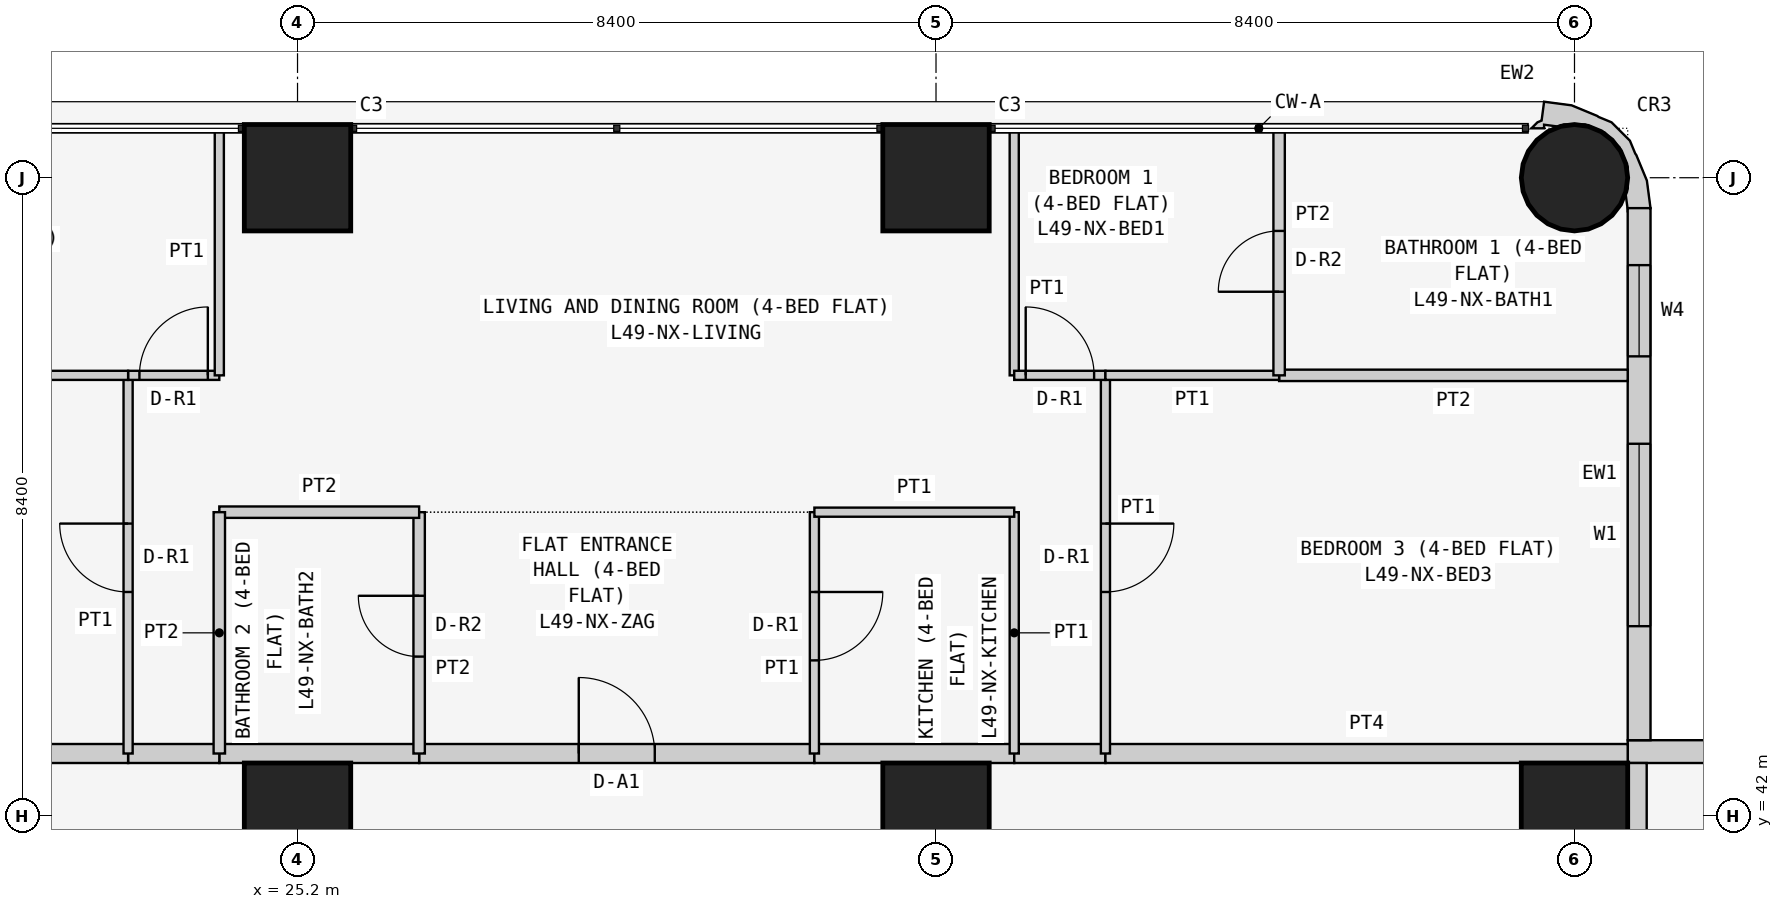
"""IFC4 building model, lengths in metres.
Left out: names, types, materials, properties, quantities, classifications, styles, units other than length and angle.
Written with IfcOpenShell. Run it as: python <this file> out.ifc"""

import sys

from ifc_helpers import new_model, si_unit, direction, frame, frame_2d, origin, origin_2d, place, context, subcontext, project, spatial, polyline, rectangle, circle, outline, extrude, element, fill, save


model = new_model("IFC4")
c1 = context("Model", 3, precision=1e-05, world=origin(), true_north=direction((0.0, 1.0)))
c2 = subcontext(c1, "Body", "Model", "MODEL_VIEW")
j1 = project(units=[si_unit("LENGTHUNIT", "METRE"), si_unit("PLANEANGLEUNIT", "RADIAN")], contexts=[c1])
p1 = place(None, origin())
s1 = spatial("IfcSite", under=j1, at=p1, CompositionType="ELEMENT")
p2 = place(p1, origin())
s2 = spatial("IfcBuilding", under=s1, at=p2, CompositionType="ELEMENT")
p3 = place(p2, frame((0.0, 0.0, 190.5)))
s3 = spatial("IfcBuildingStorey", under=s2, at=p3, CompositionType="ELEMENT", Elevation=190.5)
for number, where, z_axis, x_axis in (
    (1, (25.2, 42.0, 0.0), (0.0, 0.0, 1.0), (1.0, 0.0, 0.0)),
    (2, (25.2, 50.4, 0.0), (0.0, 0.0, 1.0), (1.0, 0.0, 0.0)),
    (3, (33.6, 42.0, 0.0), (0.0, 0.0, 1.0), (1.0, 0.0, 0.0)),
    (4, (33.6, 50.4, 0.0), (0.0, 0.0, 1.0), (1.0, 0.0, 0.0)),
    (5, (42.0, 42.0, 0.0), (0.0, 0.0, 1.0), (1.0, 0.0, 0.0)),
):
    element("IfcColumn", number, at=place(p3, frame(where, z_axis=z_axis, x_axis=x_axis)), inside=s3, PredefinedType="COLUMN", context=c2, shape_type="SweptSolid", body=[
        extrude(rectangle(XDim=1.4, YDim=1.4, at=origin_2d()), origin(), (0.0, 0.0, 1.0), 3.6),
    ])
p4 = place(p3, frame((42.0, 50.4, 0.0), z_axis=(0.0, 0.0, 1.0), x_axis=(1.0, 0.0, 0.0)))
e6 = element("IfcColumn", 6, at=p4, inside=s3, PredefinedType="COLUMN", context=c2, shape_type="SweptSolid", body=[
    extrude(circle(Radius=0.7, at=origin_2d()), origin(), (0.0, 0.0, 1.0), 3.6),
])
p5 = place(p3, frame((50.0, 42.85, 0.0), z_axis=(0.0, 0.0, 1.0), x_axis=(-1.0, 0.0, 0.0)))
e7 = element("IfcWall", 7, at=p5, inside=s3, PredefinedType="SOLIDWALL", context=c2, shape_type="SweptSolid", body=[
    extrude(rectangle(XDim=7.3, YDim=0.3, at=frame_2d((3.65, 0.0))), origin(), (0.0, 0.0, 1.0), 3.45),
])
p6 = place(p5, frame((3.1, 0.0, 0.9)))
e8 = element("IfcOpeningElement", 8, at=p6, cuts=e7, PredefinedType="OPENING", context=c2, shape_type="SweptSolid", body=[
    extrude(rectangle(XDim=2.4, YDim=1.5, at=frame_2d((1.2, 0.75))), frame((0.0, 0.16, 0.0), z_axis=(0.0, -1.0, 0.0), x_axis=(1.0, 0.0, 0.0)), (0.0, 0.0, 1.0), 0.32),
])
p7 = place(p5, frame((0.75, 0.0, 0.9)))
e9 = element("IfcOpeningElement", 9, at=p7, cuts=e7, PredefinedType="OPENING", context=c2, shape_type="SweptSolid", body=[
    extrude(rectangle(XDim=1.2, YDim=1.5, at=frame_2d((0.6, 0.75))), frame((0.0, 0.16, 0.0), z_axis=(0.0, -1.0, 0.0), x_axis=(1.0, 0.0, 0.0)), (0.0, 0.0, 1.0), 0.32),
])
p8 = place(p3, frame((42.85, 43.0, 0.0), z_axis=(0.0, 0.0, 1.0), x_axis=(0.0, 1.0, 0.0)))
e10 = element("IfcWall", 10, at=p8, inside=s3, PredefinedType="SOLIDWALL", context=c2, shape_type="SweptSolid", body=[
    extrude(rectangle(XDim=7.0, YDim=0.3, at=frame_2d((3.5, 0.0))), origin(), (0.0, 0.0, 1.0), 3.45),
])
p9 = place(p8, frame((1.5, 0.0, 0.9)))
e11 = element("IfcOpeningElement", 11, at=p9, cuts=e10, PredefinedType="OPENING", context=c2, shape_type="SweptSolid", body=[
    extrude(rectangle(XDim=2.4, YDim=1.5, at=frame_2d((1.2, 0.75))), frame((0.0, 0.16, 0.0), z_axis=(0.0, -1.0, 0.0), x_axis=(1.0, 0.0, 0.0)), (0.0, 0.0, 1.0), 0.32),
])
p10 = place(p8, frame((5.05, 0.0, 0.9)))
e12 = element("IfcOpeningElement", 12, at=p10, cuts=e10, PredefinedType="OPENING", context=c2, shape_type="SweptSolid", body=[
    extrude(rectangle(XDim=1.2, YDim=1.5, at=frame_2d((0.6, 0.75))), frame((0.0, 0.16, 0.0), z_axis=(0.0, -1.0, 0.0), x_axis=(1.0, 0.0, 0.0)), (0.0, 0.0, 1.0), 0.32),
])
p11 = place(p3, frame((42.724, 50.11, 0.0), z_axis=(0.0, 0.0, 1.0), x_axis=(0.439933741929, 0.898030234854, 0.0)))
e13 = element("IfcWall", 13, at=p11, inside=s3, PredefinedType="SOLIDWALL", context=c2, shape_type="SweptSolid", body=[
    extrude(outline(polyline([(-0.145, -0.044), (0.022, -0.296), (0.327, -0.094), (0.568, 0.18), (0.577, 0.199), (0.7, 0.337), (0.811, 0.661), (0.799, 0.845), (0.803, 0.866), (0.78, 1.231), (0.664, 1.577), (0.426, 1.497), (0.382, 1.536), (0.276, 1.572), (0.349, 1.423), (0.392, 1.444), (0.453, 1.261), (0.51, 1.211), (0.632, 0.961), (0.65, 0.683), (0.56, 0.419), (0.375, 0.21), (0.125, 0.087), (0.05, 0.082), (-0.127, -0.035), (-0.145, -0.044)])), origin(), (0.0, 0.0, 1.0), 3.45),
])
p12 = place(p3, frame((26.8, 42.825, 0.0), z_axis=(0.0, 0.0, 1.0), x_axis=(1.0, 0.0, 0.0)))
e14 = element("IfcWall", 14, at=p12, inside=s3, PredefinedType="PARTITIONING", context=c2, shape_type="SweptSolid", body=[
    extrude(rectangle(XDim=5.2, YDim=0.25, at=frame_2d((2.6, 0.0))), origin(), (0.0, 0.0, 1.0), 3.45),
])
p13 = place(p12, frame((2.1, 0.0, 0.0)))
e15 = element("IfcOpeningElement", 15, at=p13, cuts=e14, PredefinedType="OPENING", context=c2, shape_type="SweptSolid", body=[
    extrude(rectangle(XDim=1.0, YDim=2.1, at=frame_2d((0.5, 1.05))), frame((0.0, 0.135, 0.0), z_axis=(0.0, -1.0, 0.0), x_axis=(1.0, 0.0, 0.0)), (0.0, 0.0, 1.0), 0.27),
])
p14 = place(p3, frame((24.171, 42.825, 0.0), z_axis=(0.0, 0.0, 1.0), x_axis=(1.0, 0.0, 0.0)))
e16 = element("IfcWall", 16, at=p14, inside=s3, PredefinedType="PARTITIONING", context=c2, shape_type="SweptSolid", body=[
    extrude(rectangle(XDim=2.629, YDim=0.25, at=frame_2d((1.314, 0.0))), origin(), (0.0, 0.0, 1.0), 3.45),
])
p15 = place(p3, frame((32.0, 42.825, 0.0), z_axis=(0.0, 0.0, 1.0), x_axis=(1.0, 0.0, 0.0)))
e17 = element("IfcWall", 17, at=p15, inside=s3, PredefinedType="PARTITIONING", context=c2, shape_type="SweptSolid", body=[
    extrude(rectangle(XDim=2.629, YDim=0.25, at=frame_2d((1.314, 0.0))), origin(), (0.0, 0.0, 1.0), 3.45),
])
p16 = place(p3, frame((22.971, 42.825, 0.0), z_axis=(0.0, 0.0, 1.0), x_axis=(1.0, 0.0, 0.0)))
e18 = element("IfcWall", 18, at=p16, inside=s3, PredefinedType="PARTITIONING", context=c2, shape_type="SweptSolid", body=[
    extrude(rectangle(XDim=1.2, YDim=0.25, at=frame_2d((0.6, 0.0))), origin(), (0.0, 0.0, 1.0), 3.45),
])
p17 = place(p3, frame((34.629, 42.825, 0.0), z_axis=(0.0, 0.0, 1.0), x_axis=(1.0, 0.0, 0.0)))
e19 = element("IfcWall", 19, at=p17, inside=s3, PredefinedType="PARTITIONING", context=c2, shape_type="SweptSolid", body=[
    extrude(rectangle(XDim=1.2, YDim=0.25, at=frame_2d((0.6, 0.0))), origin(), (0.0, 0.0, 1.0), 3.45),
])
for number, where, z_axis, x_axis in (
    (20, (16.1, 42.825, 0.0), (0.0, 0.0, 1.0), (1.0, 0.0, 0.0)),
    (21, (35.829, 42.825, 0.0), (0.0, 0.0, 1.0), (1.0, 0.0, 0.0)),
    (22, (42.825, 42.7, 0.0), (0.0, 0.0, 1.0), (0.0, -1.0, 0.0)),
):
    element("IfcWall", number, at=place(p3, frame(where, z_axis=z_axis, x_axis=x_axis)), inside=s3, PredefinedType="PARTITIONING", context=c2, shape_type="SweptSolid", body=[
        extrude(rectangle(XDim=6.871, YDim=0.25, at=frame_2d((3.436, 0.0))), origin(), (0.0, 0.0, 1.0), 3.45),
    ])
p18 = place(p3, frame((26.8, 46.0, 0.0), z_axis=(0.0, 0.0, 1.0), x_axis=(0.0, -1.0, 0.0)))
e23 = element("IfcWall", 23, at=p18, inside=s3, PredefinedType="PARTITIONING", context=c2, shape_type="SweptSolid", body=[
    extrude(rectangle(XDim=3.175, YDim=0.15, at=frame_2d((1.587, 0.0))), origin(), (0.0, 0.0, 1.0), 3.45),
])
p19 = place(p18, frame((1.1, 0.0, 0.0)))
e24 = element("IfcOpeningElement", 24, at=p19, cuts=e23, PredefinedType="OPENING", context=c2, shape_type="SweptSolid", body=[
    extrude(rectangle(XDim=0.8, YDim=2.1, at=frame_2d((0.4, 1.05))), frame((0.0, 0.085, 0.0), z_axis=(0.0, -1.0, 0.0), x_axis=(1.0, 0.0, 0.0)), (0.0, 0.0, 1.0), 0.17),
])
p20 = place(p3, frame((32.0, 42.825, 0.0), z_axis=(0.0, 0.0, 1.0), x_axis=(0.0, 1.0, 0.0)))
e25 = element("IfcWall", 25, at=p20, inside=s3, PredefinedType="PARTITIONING", context=c2, shape_type="SweptSolid", body=[
    extrude(rectangle(XDim=3.175, YDim=0.12, at=frame_2d((1.587, 0.0))), origin(), (0.0, 0.0, 1.0), 3.45),
])
p21 = place(p20, frame((1.225, 0.0, 0.0)))
e26 = element("IfcOpeningElement", 26, at=p21, cuts=e25, PredefinedType="OPENING", context=c2, shape_type="SweptSolid", body=[
    extrude(rectangle(XDim=0.9, YDim=2.1, at=frame_2d((0.45, 1.05))), frame((0.0, 0.07, 0.0), z_axis=(0.0, -1.0, 0.0), x_axis=(1.0, 0.0, 0.0)), (0.0, 0.0, 1.0), 0.14),
])
p22 = place(p3, frame((26.8, 46.0, 0.0), z_axis=(0.0, 0.0, 1.0), x_axis=(-1.0, 0.0, 0.0)))
e27 = element("IfcWall", 27, at=p22, inside=s3, PredefinedType="PARTITIONING", context=c2, shape_type="SweptSolid", body=[
    extrude(rectangle(XDim=2.629, YDim=0.15, at=frame_2d((1.314, 0.0))), origin(), (0.0, 0.0, 1.0), 3.45),
])
p23 = place(p3, frame((24.171, 46.0, 0.0), z_axis=(0.0, 0.0, 1.0), x_axis=(0.0, -1.0, 0.0)))
e28 = element("IfcWall", 28, at=p23, inside=s3, PredefinedType="PARTITIONING", context=c2, shape_type="SweptSolid", body=[
    extrude(rectangle(XDim=3.175, YDim=0.15, at=frame_2d((1.587, 0.0))), origin(), (0.0, 0.0, 1.0), 3.45),
])
p24 = place(p3, frame((34.629, 42.825, 0.0), z_axis=(0.0, 0.0, 1.0), x_axis=(0.0, 1.0, 0.0)))
e29 = element("IfcWall", 29, at=p24, inside=s3, PredefinedType="PARTITIONING", context=c2, shape_type="SweptSolid", body=[
    extrude(rectangle(XDim=3.175, YDim=0.12, at=frame_2d((1.587, 0.0))), origin(), (0.0, 0.0, 1.0), 3.45),
])
p25 = place(p3, frame((34.629, 46.0, 0.0), z_axis=(0.0, 0.0, 1.0), x_axis=(-1.0, 0.0, 0.0)))
e30 = element("IfcWall", 30, at=p25, inside=s3, PredefinedType="PARTITIONING", context=c2, shape_type="SweptSolid", body=[
    extrude(rectangle(XDim=2.629, YDim=0.12, at=frame_2d((1.314, 0.0))), origin(), (0.0, 0.0, 1.0), 3.45),
])
p26 = place(p3, frame((22.971, 42.825, 0.0), z_axis=(0.0, 0.0, 1.0), x_axis=(0.0, 1.0, 0.0)))
e31 = element("IfcWall", 31, at=p26, inside=s3, PredefinedType="PARTITIONING", context=c2, shape_type="SweptSolid", body=[
    extrude(rectangle(XDim=4.975, YDim=0.12, at=frame_2d((2.488, 0.0))), origin(), (0.0, 0.0, 1.0), 3.45),
])
p27 = place(p26, frame((2.125, 0.0, 0.0)))
e32 = element("IfcOpeningElement", 32, at=p27, cuts=e31, PredefinedType="OPENING", context=c2, shape_type="SweptSolid", body=[
    extrude(rectangle(XDim=0.9, YDim=2.1, at=frame_2d((0.45, 1.05))), frame((0.0, 0.07, 0.0), z_axis=(0.0, -1.0, 0.0), x_axis=(1.0, 0.0, 0.0)), (0.0, 0.0, 1.0), 0.14),
])
p28 = place(p3, frame((22.971, 47.8, 0.0), z_axis=(0.0, 0.0, 1.0), x_axis=(1.0, 0.0, 0.0)))
e33 = element("IfcWall", 33, at=p28, inside=s3, PredefinedType="PARTITIONING", context=c2, shape_type="SweptSolid", body=[
    extrude(rectangle(XDim=1.2, YDim=0.12, at=frame_2d((0.6, 0.0))), origin(), (0.0, 0.0, 1.0), 3.45),
])
p29 = place(p28, frame((0.149, 0.0, 0.0)))
e34 = element("IfcOpeningElement", 34, at=p29, cuts=e33, PredefinedType="OPENING", context=c2, shape_type="SweptSolid", body=[
    extrude(rectangle(XDim=0.9, YDim=2.1, at=frame_2d((0.45, 1.05))), frame((0.0, 0.07, 0.0), z_axis=(0.0, -1.0, 0.0), x_axis=(1.0, 0.0, 0.0)), (0.0, 0.0, 1.0), 0.14),
])
p30 = place(p3, frame((24.171, 47.8, 0.0), z_axis=(0.0, 0.0, 1.0), x_axis=(0.0, 1.0, 0.0)))
e35 = element("IfcWall", 35, at=p30, inside=s3, PredefinedType="PARTITIONING", context=c2, shape_type="SweptSolid", body=[
    extrude(rectangle(XDim=3.25, YDim=0.12, at=frame_2d((1.625, 0.0))), origin(), (0.0, 0.0, 1.0), 3.45),
])
p31 = place(p3, frame((35.829, 47.8, 0.0), z_axis=(0.0, 0.0, 1.0), x_axis=(0.0, -1.0, 0.0)))
e36 = element("IfcWall", 36, at=p31, inside=s3, PredefinedType="PARTITIONING", context=c2, shape_type="SweptSolid", body=[
    extrude(rectangle(XDim=4.975, YDim=0.12, at=frame_2d((2.488, 0.0))), origin(), (0.0, 0.0, 1.0), 3.45),
])
p32 = place(p31, frame((1.95, 0.0, 0.0)))
e37 = element("IfcOpeningElement", 37, at=p32, cuts=e36, PredefinedType="OPENING", context=c2, shape_type="SweptSolid", body=[
    extrude(rectangle(XDim=0.9, YDim=2.1, at=frame_2d((0.45, 1.05))), frame((0.0, 0.07, 0.0), z_axis=(0.0, -1.0, 0.0), x_axis=(1.0, 0.0, 0.0)), (0.0, 0.0, 1.0), 0.14),
])
p33 = place(p3, frame((34.629, 51.05, 0.0), z_axis=(0.0, 0.0, 1.0), x_axis=(0.0, -1.0, 0.0)))
e38 = element("IfcWall", 38, at=p33, inside=s3, PredefinedType="PARTITIONING", context=c2, shape_type="SweptSolid", body=[
    extrude(rectangle(XDim=3.25, YDim=0.12, at=frame_2d((1.625, 0.0))), origin(), (0.0, 0.0, 1.0), 3.45),
])
p34 = place(p3, frame((34.629, 47.8, 0.0), z_axis=(0.0, 0.0, 1.0), x_axis=(1.0, 0.0, 0.0)))
e39 = element("IfcWall", 39, at=p34, inside=s3, PredefinedType="PARTITIONING", context=c2, shape_type="SweptSolid", body=[
    extrude(rectangle(XDim=1.2, YDim=0.12, at=frame_2d((0.6, 0.0))), origin(), (0.0, 0.0, 1.0), 3.45),
])
p35 = place(p34, frame((0.151, 0.0, 0.0)))
e40 = element("IfcOpeningElement", 40, at=p35, cuts=e39, PredefinedType="OPENING", context=c2, shape_type="SweptSolid", body=[
    extrude(rectangle(XDim=0.9, YDim=2.1, at=frame_2d((0.45, 1.05))), frame((0.0, 0.07, 0.0), z_axis=(0.0, -1.0, 0.0), x_axis=(1.0, 0.0, 0.0)), (0.0, 0.0, 1.0), 0.14),
])
p36 = place(p3, frame((22.971, 47.8, 0.0), z_axis=(0.0, 0.0, 1.0), x_axis=(-1.0, 0.0, 0.0)))
e41 = element("IfcWall", 41, at=p36, inside=s3, PredefinedType="PARTITIONING", context=c2, shape_type="SweptSolid", body=[
    extrude(rectangle(XDim=6.871, YDim=0.12, at=frame_2d((3.436, 0.0))), origin(), (0.0, 0.0, 1.0), 3.45),
])
p37 = place(p3, frame((42.7, 47.8, 0.0), z_axis=(0.0, 0.0, 1.0), x_axis=(-1.0, 0.0, 0.0)))
e42 = element("IfcWall", 42, at=p37, inside=s3, PredefinedType="PARTITIONING", context=c2, shape_type="SweptSolid", body=[
    extrude(rectangle(XDim=4.586, YDim=0.15, at=frame_2d((2.293, 0.0))), origin(), (0.0, 0.0, 1.0), 3.45),
])
p38 = place(p3, frame((38.114, 47.8, 0.0), z_axis=(0.0, 0.0, 1.0), x_axis=(-1.0, 0.0, 0.0)))
e43 = element("IfcWall", 43, at=p38, inside=s3, PredefinedType="PARTITIONING", context=c2, shape_type="SweptSolid", body=[
    extrude(rectangle(XDim=2.285, YDim=0.12, at=frame_2d((1.143, 0.0))), origin(), (0.0, 0.0, 1.0), 3.45),
])
p39 = place(p3, frame((38.114, 51.05, 0.0), z_axis=(0.0, 0.0, 1.0), x_axis=(0.0, -1.0, 0.0)))
e44 = element("IfcWall", 44, at=p39, inside=s3, PredefinedType="PARTITIONING", context=c2, shape_type="SweptSolid", body=[
    extrude(rectangle(XDim=3.25, YDim=0.15, at=frame_2d((1.625, 0.0))), origin(), (0.0, 0.0, 1.0), 3.45),
])
p40 = place(p39, frame((1.35, 0.0, 0.0)))
e45 = element("IfcOpeningElement", 45, at=p40, cuts=e44, PredefinedType="OPENING", context=c2, shape_type="SweptSolid", body=[
    extrude(rectangle(XDim=0.8, YDim=2.1, at=frame_2d((0.4, 1.05))), frame((0.0, 0.085, 0.0), z_axis=(0.0, -1.0, 0.0), x_axis=(1.0, 0.0, 0.0)), (0.0, 0.0, 1.0), 0.17),
])
p41 = place(p9, origin())
e46 = element("IfcWindow", 46, at=p41, inside=s3, PartitioningType="SINGLE_PANEL", PredefinedType="WINDOW", context=c2, shape_type="SweptSolid", body=[
    extrude(rectangle(XDim=2.4, YDim=1.5, at=frame_2d((1.2, 0.75))), frame((0.0, 0.03, 0.0), z_axis=(0.0, -1.0, 0.0), x_axis=(1.0, 0.0, 0.0)), (0.0, 0.0, 1.0), 0.06),
])
fill(e11, e46)
p42 = place(p10, origin())
e47 = element("IfcWindow", 47, at=p42, inside=s3, PartitioningType="SINGLE_PANEL", PredefinedType="WINDOW", context=c2, shape_type="SweptSolid", body=[
    extrude(rectangle(XDim=1.2, YDim=1.5, at=frame_2d((0.6, 0.75))), frame((0.0, 0.03, 0.0), z_axis=(0.0, -1.0, 0.0), x_axis=(1.0, 0.0, 0.0)), (0.0, 0.0, 1.0), 0.06),
])
fill(e12, e47)
p43 = place(p13, origin())
e48 = element("IfcDoor", 48, at=p43, inside=s3, OperationType="SINGLE_SWING_LEFT", PredefinedType="DOOR", context=c2, shape_type="SweptSolid", body=[
    extrude(rectangle(XDim=1.0, YDim=2.1, at=frame_2d((0.5, 1.05))), frame((0.0, 0.025, 0.0), z_axis=(0.0, -1.0, 0.0), x_axis=(1.0, 0.0, 0.0)), (0.0, 0.0, 1.0), 0.05),
])
fill(e15, e48)
p44 = place(p19, frame((0.8, 0.0, 0.0), z_axis=(0.0, 0.0, 1.0), x_axis=(-1.0, 0.0, 0.0)))
e49 = element("IfcDoor", 49, at=p44, inside=s3, OperationType="SINGLE_SWING_RIGHT", PredefinedType="DOOR", context=c2, shape_type="SweptSolid", body=[
    extrude(rectangle(XDim=0.8, YDim=2.1, at=frame_2d((0.4, 1.05))), frame((0.0, 0.025, 0.0), z_axis=(0.0, -1.0, 0.0), x_axis=(1.0, 0.0, 0.0)), (0.0, 0.0, 1.0), 0.05),
])
fill(e24, e49)
p45 = place(p21, frame((0.9, 0.0, 0.0), z_axis=(0.0, 0.0, 1.0), x_axis=(-1.0, 0.0, 0.0)))
e50 = element("IfcDoor", 50, at=p45, inside=s3, OperationType="SINGLE_SWING_LEFT", PredefinedType="DOOR", context=c2, shape_type="SweptSolid", body=[
    extrude(rectangle(XDim=0.9, YDim=2.1, at=frame_2d((0.45, 1.05))), frame((0.0, 0.025, 0.0), z_axis=(0.0, -1.0, 0.0), x_axis=(1.0, 0.0, 0.0)), (0.0, 0.0, 1.0), 0.05),
])
fill(e26, e50)
p46 = place(p27, origin())
e51 = element("IfcDoor", 51, at=p46, inside=s3, OperationType="SINGLE_SWING_RIGHT", PredefinedType="DOOR", context=c2, shape_type="SweptSolid", body=[
    extrude(rectangle(XDim=0.9, YDim=2.1, at=frame_2d((0.45, 1.05))), frame((0.0, 0.025, 0.0), z_axis=(0.0, -1.0, 0.0), x_axis=(1.0, 0.0, 0.0)), (0.0, 0.0, 1.0), 0.05),
])
fill(e32, e51)
p47 = place(p29, origin())
e52 = element("IfcDoor", 52, at=p47, inside=s3, OperationType="SINGLE_SWING_RIGHT", PredefinedType="DOOR", context=c2, shape_type="SweptSolid", body=[
    extrude(rectangle(XDim=0.9, YDim=2.1, at=frame_2d((0.45, 1.05))), frame((0.0, 0.025, 0.0), z_axis=(0.0, -1.0, 0.0), x_axis=(1.0, 0.0, 0.0)), (0.0, 0.0, 1.0), 0.05),
])
fill(e34, e52)
p48 = place(p32, origin())
e53 = element("IfcDoor", 53, at=p48, inside=s3, OperationType="SINGLE_SWING_LEFT", PredefinedType="DOOR", context=c2, shape_type="SweptSolid", body=[
    extrude(rectangle(XDim=0.9, YDim=2.1, at=frame_2d((0.45, 1.05))), frame((0.0, 0.025, 0.0), z_axis=(0.0, -1.0, 0.0), x_axis=(1.0, 0.0, 0.0)), (0.0, 0.0, 1.0), 0.05),
])
fill(e37, e53)
p49 = place(p35, origin())
e54 = element("IfcDoor", 54, at=p49, inside=s3, OperationType="SINGLE_SWING_LEFT", PredefinedType="DOOR", context=c2, shape_type="SweptSolid", body=[
    extrude(rectangle(XDim=0.9, YDim=2.1, at=frame_2d((0.45, 1.05))), frame((0.0, 0.025, 0.0), z_axis=(0.0, -1.0, 0.0), x_axis=(1.0, 0.0, 0.0)), (0.0, 0.0, 1.0), 0.05),
])
fill(e40, e54)
p50 = place(p40, frame((0.8, 0.0, 0.0), z_axis=(0.0, 0.0, 1.0), x_axis=(-1.0, 0.0, 0.0)))
e55 = element("IfcDoor", 55, at=p50, inside=s3, OperationType="SINGLE_SWING_LEFT", PredefinedType="DOOR", context=c2, shape_type="SweptSolid", body=[
    extrude(rectangle(XDim=0.8, YDim=2.1, at=frame_2d((0.4, 1.05))), frame((0.0, 0.025, 0.0), z_axis=(0.0, -1.0, 0.0), x_axis=(1.0, 0.0, 0.0)), (0.0, 0.0, 1.0), 0.05),
])
fill(e45, e55)
save(model, sys.argv[1])
